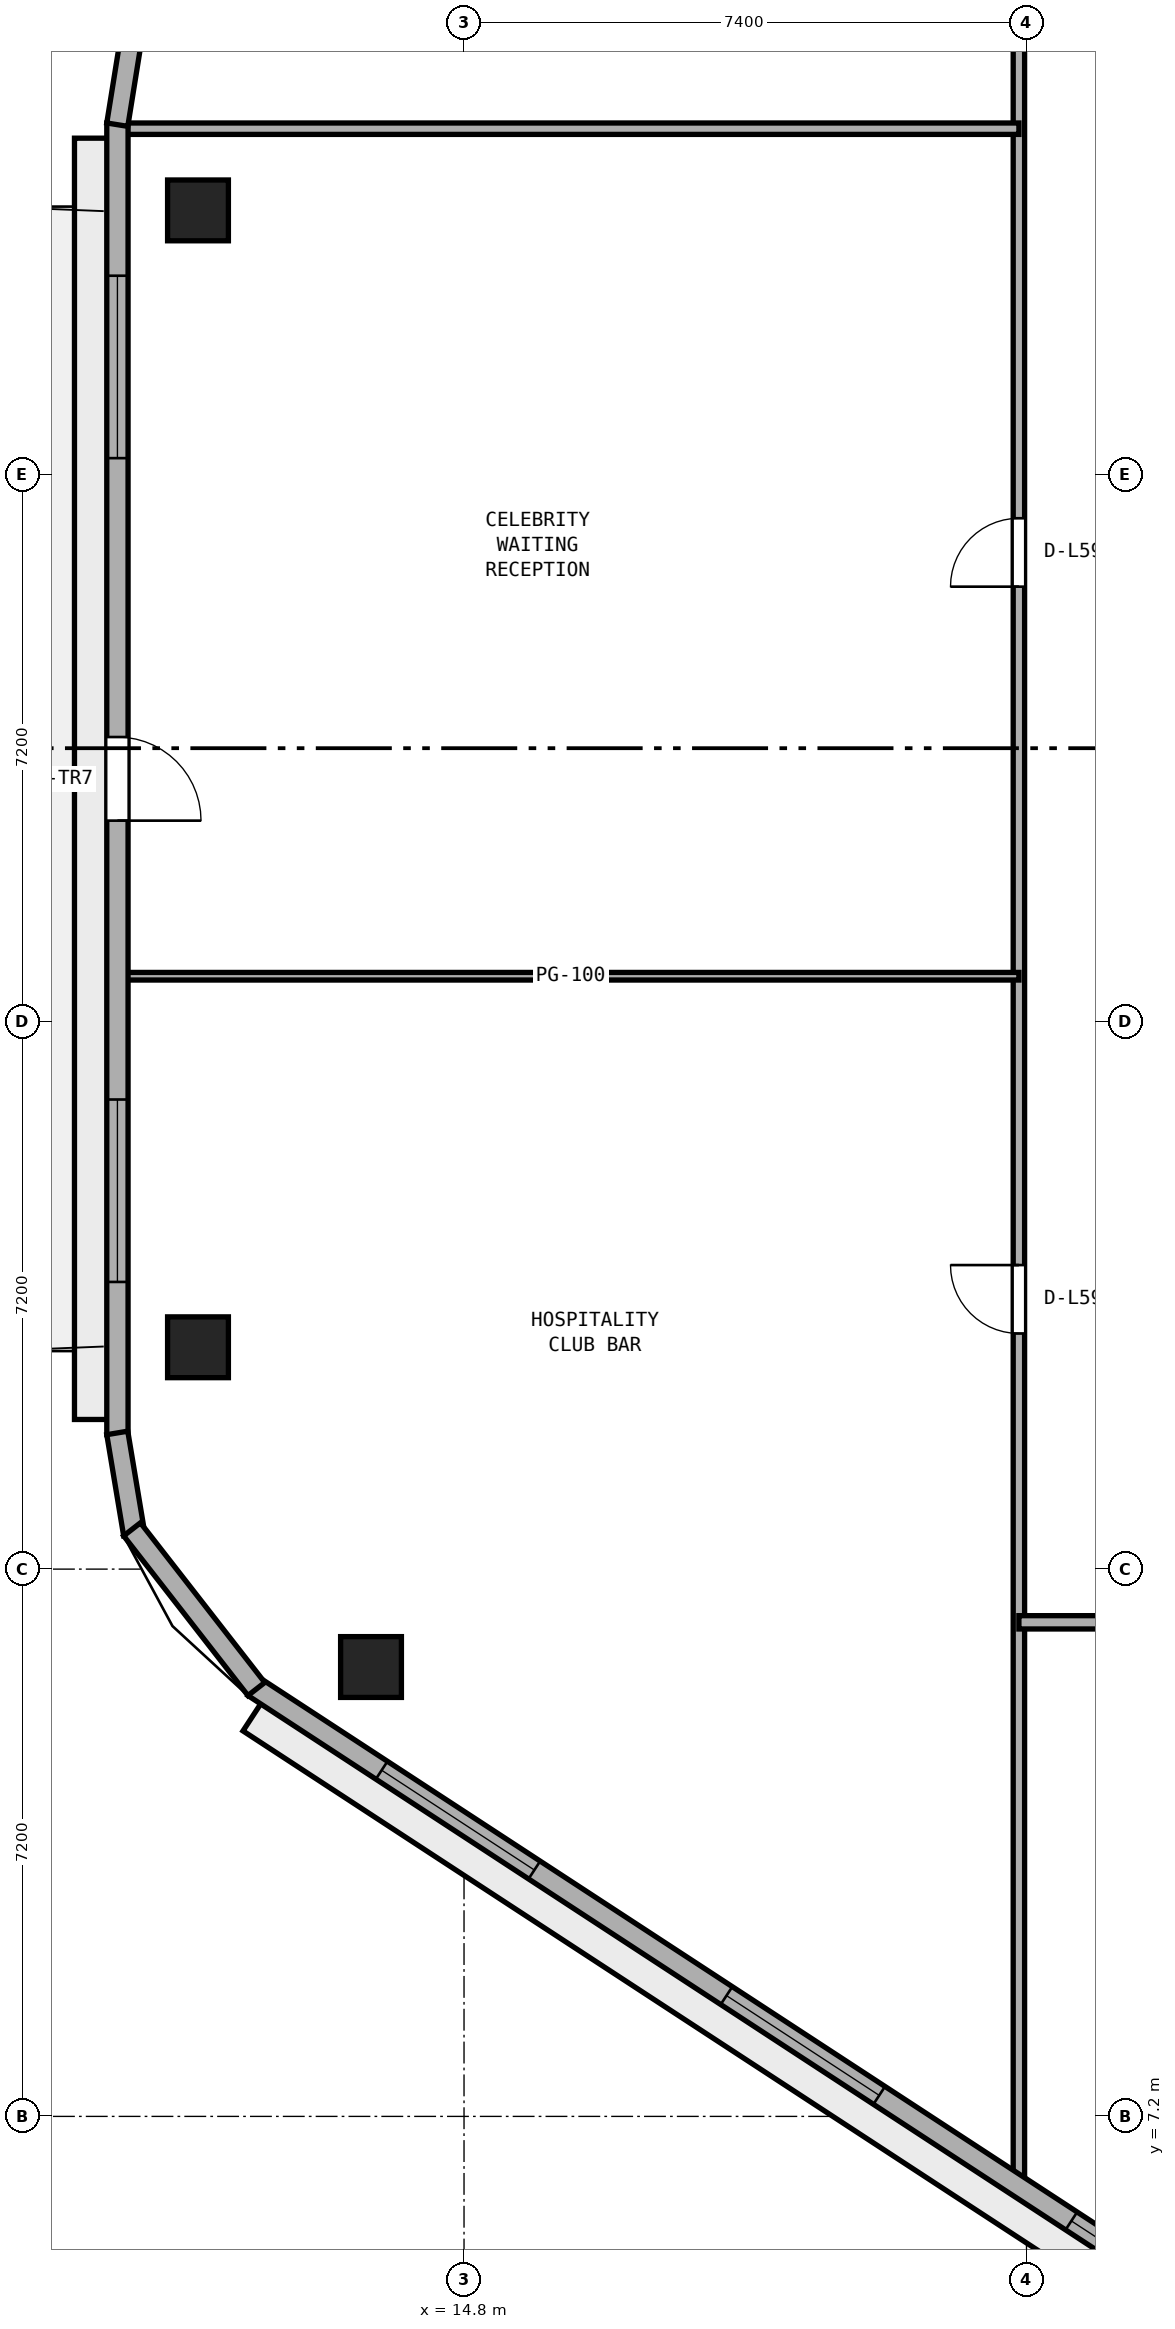
"""IFC4 building model, lengths in metres.
Left out: names, types, materials, properties, quantities, classifications, styles, units other than length and angle.
Written with IfcOpenShell. Run it as: python <this file> out.ifc"""

import sys

from ifc_helpers import new_model, si_unit, direction, frame, frame_2d, origin, origin_2d, place, context, subcontext, project, spatial, rectangle, extrude, element, fill, save


model = new_model("IFC4")
c1 = context("Model", 3, precision=1e-05, world=origin(), true_north=direction((0.0, 1.0)))
c2 = subcontext(c1, "Body", "Model", "MODEL_VIEW")
j1 = project(units=[si_unit("LENGTHUNIT", "METRE"), si_unit("PLANEANGLEUNIT", "RADIAN")], contexts=[c1])
p1 = place(None, origin())
s1 = spatial("IfcSite", under=j1, at=p1, CompositionType="ELEMENT")
p2 = place(p1, origin())
s2 = spatial("IfcBuilding", under=s1, at=p2, CompositionType="ELEMENT")
p3 = place(p2, frame((0.0, 0.0, 232.6)))
s3 = spatial("IfcBuildingStorey", under=s2, at=p3, CompositionType="ELEMENT", Elevation=232.6)
for number, where, z_axis, x_axis in (
    (1, (11.3, 32.275, 0.0), (0.0, 0.0, 1.0), (1.0, 0.0, 0.0)),
    (2, (11.3, 17.319, 0.0), (0.0, 0.0, 1.0), (1.0, 0.0, 0.0)),
    (3, (13.576, 13.112, 0.0), (0.0, 0.0, 1.0), (1.0, 0.0, 0.0)),
):
    element("IfcColumn", number, at=place(p3, frame(where, z_axis=z_axis, x_axis=x_axis)), inside=s3, PredefinedType="COLUMN", context=c2, shape_type="SweptSolid", body=[
        extrude(rectangle(XDim=0.8, YDim=0.8, at=origin_2d()), origin(), (0.0, 0.0, 1.0), 3.8),
    ])
p4 = place(p3, frame((22.1, 6.248, 0.0), z_axis=(0.0, 0.0, 1.0), x_axis=(0.0, 1.0, 0.0)))
e4 = element("IfcWall", 4, at=p4, inside=s3, PredefinedType="PARTITIONING", context=c2, shape_type="SweptSolid", body=[
    extrude(rectangle(XDim=30.452, YDim=0.15, at=frame_2d((15.226, 0.0))), origin(), (0.0, 0.0, 1.0), 3.51),
])
p5 = place(p4, frame((11.252, 0.0, 0.0)))
e5 = element("IfcOpeningElement", 5, at=p5, cuts=e4, PredefinedType="OPENING", context=c2, shape_type="SweptSolid", body=[
    extrude(rectangle(XDim=0.9, YDim=2.1, at=frame_2d((0.45, 1.05))), frame((0.0, 0.085, 0.0), z_axis=(0.0, -1.0, 0.0), x_axis=(1.0, 0.0, 0.0)), (0.0, 0.0, 1.0), 0.17),
])
p6 = place(p4, frame((21.077, 0.0, 0.0)))
e6 = element("IfcOpeningElement", 6, at=p6, cuts=e4, PredefinedType="OPENING", context=c2, shape_type="SweptSolid", body=[
    extrude(rectangle(XDim=0.9, YDim=2.1, at=frame_2d((0.45, 1.05))), frame((0.0, 0.085, 0.0), z_axis=(0.0, -1.0, 0.0), x_axis=(1.0, 0.0, 0.0)), (0.0, 0.0, 1.0), 0.17),
])
p7 = place(p3, frame((22.1, 13.7, 0.0), z_axis=(0.0, 0.0, 1.0), x_axis=(1.0, 0.0, 0.0)))
e7 = element("IfcWall", 7, at=p7, inside=s3, PredefinedType="PARTITIONING", context=c2, shape_type="SweptSolid", body=[
    extrude(rectangle(XDim=26.5, YDim=0.175, at=frame_2d((13.25, 0.0))), origin(), (0.0, 0.0, 1.0), 3.51),
])
p8 = place(p7, frame((7.12, 0.0, 0.0)))
e8 = element("IfcOpeningElement", 8, at=p8, cuts=e7, PredefinedType="OPENING", context=c2, shape_type="SweptSolid", body=[
    extrude(rectangle(XDim=0.9, YDim=2.1, at=frame_2d((0.45, 1.05))), frame((0.0, 0.097, 0.0), z_axis=(0.0, -1.0, 0.0), x_axis=(1.0, 0.0, 0.0)), (0.0, 0.0, 1.0), 0.195),
])
p9 = place(p7, frame((20.13, 0.0, 0.0)))
e9 = element("IfcOpeningElement", 9, at=p9, cuts=e7, PredefinedType="OPENING", context=c2, shape_type="SweptSolid", body=[
    extrude(rectangle(XDim=0.9, YDim=2.1, at=frame_2d((0.45, 1.05))), frame((0.0, 0.097, 0.0), z_axis=(0.0, -1.0, 0.0), x_axis=(1.0, 0.0, 0.0)), (0.0, 0.0, 1.0), 0.195),
])
p10 = place(p3, frame((10.305, 22.2, 0.0), z_axis=(0.0, 0.0, 1.0), x_axis=(1.0, 0.0, 0.0)))
e10 = element("IfcWall", 10, at=p10, inside=s3, PredefinedType="PARTITIONING", context=c2, shape_type="SweptSolid", body=[
    extrude(rectangle(XDim=11.795, YDim=0.1, at=frame_2d((5.897, 0.0))), origin(), (0.0, 0.0, 1.0), 3.51),
])
p11 = place(p3, frame((10.305, 33.35, 0.0), z_axis=(0.0, 0.0, 1.0), x_axis=(1.0, 0.0, 0.0)))
e11 = element("IfcWall", 11, at=p11, inside=s3, PredefinedType="PARTITIONING", context=c2, shape_type="SweptSolid", body=[
    extrude(rectangle(XDim=11.795, YDim=0.15, at=frame_2d((5.897, 0.0))), origin(), (0.0, 0.0, 1.0), 3.51),
])
p12 = place(p3, frame((10.24, 33.425, 0.0), z_axis=(0.0, 0.0, 1.0), x_axis=(0.0, -1.0, 0.0)))
e12 = element("IfcWall", 12, at=p12, inside=s3, PredefinedType="STANDARD", context=c2, shape_type="SweptSolid", body=[
    extrude(rectangle(XDim=17.257, YDim=0.28, at=frame_2d((8.628, 0.0))), origin(), (0.0, 0.0, 1.0), 3.51),
])
p13 = place(p12, frame((8.078, 0.0, 0.0)))
e13 = element("IfcOpeningElement", 13, at=p13, cuts=e12, PredefinedType="OPENING", context=c2, shape_type="SweptSolid", body=[
    extrude(rectangle(XDim=1.1, YDim=2.2, at=frame_2d((0.55, 1.1))), frame((0.0, 0.15, 0.0), z_axis=(0.0, -1.0, 0.0), x_axis=(1.0, 0.0, 0.0)), (0.0, 0.0, 1.0), 0.3),
])
p14 = place(p12, frame((2.01, 0.0, 0.9)))
e14 = element("IfcOpeningElement", 14, at=p14, cuts=e12, PredefinedType="OPENING", context=c2, shape_type="SweptSolid", body=[
    extrude(rectangle(XDim=2.4, YDim=1.75, at=frame_2d((1.2, 0.875))), frame((0.0, 0.15, 0.0), z_axis=(0.0, -1.0, 0.0), x_axis=(1.0, 0.0, 0.0)), (0.0, 0.0, 1.0), 0.3),
])
p15 = place(p12, frame((12.847, 0.0, 0.9)))
e15 = element("IfcOpeningElement", 15, at=p15, cuts=e12, PredefinedType="OPENING", context=c2, shape_type="SweptSolid", body=[
    extrude(rectangle(XDim=2.4, YDim=1.75, at=frame_2d((1.2, 0.875))), frame((0.0, 0.15, 0.0), z_axis=(0.0, -1.0, 0.0), x_axis=(1.0, 0.0, 0.0)), (0.0, 0.0, 1.0), 0.3),
])
p16 = place(p3, frame((12.034, 12.854, 0.0), z_axis=(0.0, 0.0, 1.0), x_axis=(0.837118352984, -0.547021812269, 0.0)))
e16 = element("IfcWall", 16, at=p16, inside=s3, PredefinedType="STANDARD", context=c2, shape_type="SweptSolid", body=[
    extrude(rectangle(XDim=17.259, YDim=0.28, at=frame_2d((8.63, 0.0))), origin(), (0.0, 0.0, 1.0), 3.51),
])
p17 = place(p16, frame((2.01, 0.0, 0.9)))
e17 = element("IfcOpeningElement", 17, at=p17, cuts=e16, PredefinedType="OPENING", context=c2, shape_type="SweptSolid", body=[
    extrude(rectangle(XDim=2.4, YDim=1.75, at=frame_2d((1.2, 0.875))), frame((0.0, 0.15, 0.0), z_axis=(0.0, -1.0, 0.0), x_axis=(1.0, 0.0, 0.0)), (0.0, 0.0, 1.0), 0.3),
])
p18 = place(p16, frame((7.43, 0.0, 0.9)))
e18 = element("IfcOpeningElement", 18, at=p18, cuts=e16, PredefinedType="OPENING", context=c2, shape_type="SweptSolid", body=[
    extrude(rectangle(XDim=2.4, YDim=1.75, at=frame_2d((1.2, 0.875))), frame((0.0, 0.15, 0.0), z_axis=(0.0, -1.0, 0.0), x_axis=(1.0, 0.0, 0.0)), (0.0, 0.0, 1.0), 0.3),
])
p19 = place(p16, frame((12.849, 0.0, 0.9)))
e19 = element("IfcOpeningElement", 19, at=p19, cuts=e16, PredefinedType="OPENING", context=c2, shape_type="SweptSolid", body=[
    extrude(rectangle(XDim=2.4, YDim=1.75, at=frame_2d((1.2, 0.875))), frame((0.0, 0.15, 0.0), z_axis=(0.0, -1.0, 0.0), x_axis=(1.0, 0.0, 0.0)), (0.0, 0.0, 1.0), 0.3),
])
p20 = place(p3, frame((10.445, 34.688, 0.0), z_axis=(0.0, 0.0, 1.0), x_axis=(-0.158524605336, -0.987355027081, 0.0)))
e20 = element("IfcWall", 20, at=p20, inside=s3, PredefinedType="STANDARD", context=c2, shape_type="SweptSolid", body=[
    extrude(rectangle(XDim=1.301, YDim=0.28, at=frame_2d((0.651, 0.0))), origin(), (0.0, 0.0, 1.0), 3.51),
])
p21 = place(p3, frame((10.238, 16.192, 0.0), z_axis=(0.0, 0.0, 1.0), x_axis=(0.164604311367, -0.986359681191, 0.0)))
e21 = element("IfcWall", 21, at=p21, inside=s3, PredefinedType="STANDARD", context=c2, shape_type="SweptSolid", body=[
    extrude(rectangle(XDim=1.35, YDim=0.28, at=frame_2d((0.675, 0.0))), origin(), (0.0, 0.0, 1.0), 3.51),
])
p22 = place(p3, frame((10.433, 14.923, 0.0), z_axis=(0.0, 0.0, 1.0), x_axis=(0.614181852676, -0.78916452774, 0.0)))
e22 = element("IfcWall", 22, at=p22, inside=s3, PredefinedType="STANDARD", context=c2, shape_type="SweptSolid", body=[
    extrude(rectangle(XDim=2.662, YDim=0.28, at=frame_2d((1.331, 0.0))), origin(), (0.0, 0.0, 1.0), 3.51),
])
p23 = place(p5, origin())
e23 = element("IfcDoor", 23, at=p23, inside=s3, OperationType="SINGLE_SWING_RIGHT", PredefinedType="DOOR", context=c2, shape_type="SweptSolid", body=[
    extrude(rectangle(XDim=0.9, YDim=2.1, at=frame_2d((0.45, 1.05))), frame((0.0, 0.025, 0.0), z_axis=(0.0, -1.0, 0.0), x_axis=(1.0, 0.0, 0.0)), (0.0, 0.0, 1.0), 0.05),
])
fill(e5, e23)
p24 = place(p6, origin())
e24 = element("IfcDoor", 24, at=p24, inside=s3, OperationType="SINGLE_SWING_LEFT", PredefinedType="DOOR", context=c2, shape_type="SweptSolid", body=[
    extrude(rectangle(XDim=0.9, YDim=2.1, at=frame_2d((0.45, 1.05))), frame((0.0, 0.025, 0.0), z_axis=(0.0, -1.0, 0.0), x_axis=(1.0, 0.0, 0.0)), (0.0, 0.0, 1.0), 0.05),
])
fill(e6, e24)
p25 = place(p13, origin())
e25 = element("IfcDoor", 25, at=p25, inside=s3, OperationType="SINGLE_SWING_RIGHT", PredefinedType="DOOR", context=c2, shape_type="SweptSolid", body=[
    extrude(rectangle(XDim=1.1, YDim=2.2, at=frame_2d((0.55, 1.1))), frame((0.0, 0.025, 0.0), z_axis=(0.0, -1.0, 0.0), x_axis=(1.0, 0.0, 0.0)), (0.0, 0.0, 1.0), 0.05),
])
fill(e13, e25)
p26 = place(p14, origin())
e26 = element("IfcWindow", 26, at=p26, inside=s3, PartitioningType="SINGLE_PANEL", PredefinedType="WINDOW", context=c2, shape_type="SweptSolid", body=[
    extrude(rectangle(XDim=2.4, YDim=1.75, at=frame_2d((1.2, 0.875))), frame((0.0, 0.03, 0.0), z_axis=(0.0, -1.0, 0.0), x_axis=(1.0, 0.0, 0.0)), (0.0, 0.0, 1.0), 0.06),
])
fill(e14, e26)
p27 = place(p15, origin())
e27 = element("IfcWindow", 27, at=p27, inside=s3, PartitioningType="SINGLE_PANEL", PredefinedType="WINDOW", context=c2, shape_type="SweptSolid", body=[
    extrude(rectangle(XDim=2.4, YDim=1.75, at=frame_2d((1.2, 0.875))), frame((0.0, 0.03, 0.0), z_axis=(0.0, -1.0, 0.0), x_axis=(1.0, 0.0, 0.0)), (0.0, 0.0, 1.0), 0.06),
])
fill(e15, e27)
p28 = place(p17, origin())
e28 = element("IfcWindow", 28, at=p28, inside=s3, PartitioningType="SINGLE_PANEL", PredefinedType="WINDOW", context=c2, shape_type="SweptSolid", body=[
    extrude(rectangle(XDim=2.4, YDim=1.75, at=frame_2d((1.2, 0.875))), frame((0.0, 0.03, 0.0), z_axis=(0.0, -1.0, 0.0), x_axis=(1.0, 0.0, 0.0)), (0.0, 0.0, 1.0), 0.06),
])
fill(e17, e28)
p29 = place(p18, origin())
e29 = element("IfcWindow", 29, at=p29, inside=s3, PartitioningType="SINGLE_PANEL", PredefinedType="WINDOW", context=c2, shape_type="SweptSolid", body=[
    extrude(rectangle(XDim=2.4, YDim=1.75, at=frame_2d((1.2, 0.875))), frame((0.0, 0.03, 0.0), z_axis=(0.0, -1.0, 0.0), x_axis=(1.0, 0.0, 0.0)), (0.0, 0.0, 1.0), 0.06),
])
fill(e18, e29)
p30 = place(p19, origin())
e30 = element("IfcWindow", 30, at=p30, inside=s3, PartitioningType="SINGLE_PANEL", PredefinedType="WINDOW", context=c2, shape_type="SweptSolid", body=[
    extrude(rectangle(XDim=2.4, YDim=1.75, at=frame_2d((1.2, 0.875))), frame((0.0, 0.03, 0.0), z_axis=(0.0, -1.0, 0.0), x_axis=(1.0, 0.0, 0.0)), (0.0, 0.0, 1.0), 0.06),
])
fill(e19, e30)
save(model, sys.argv[1])
